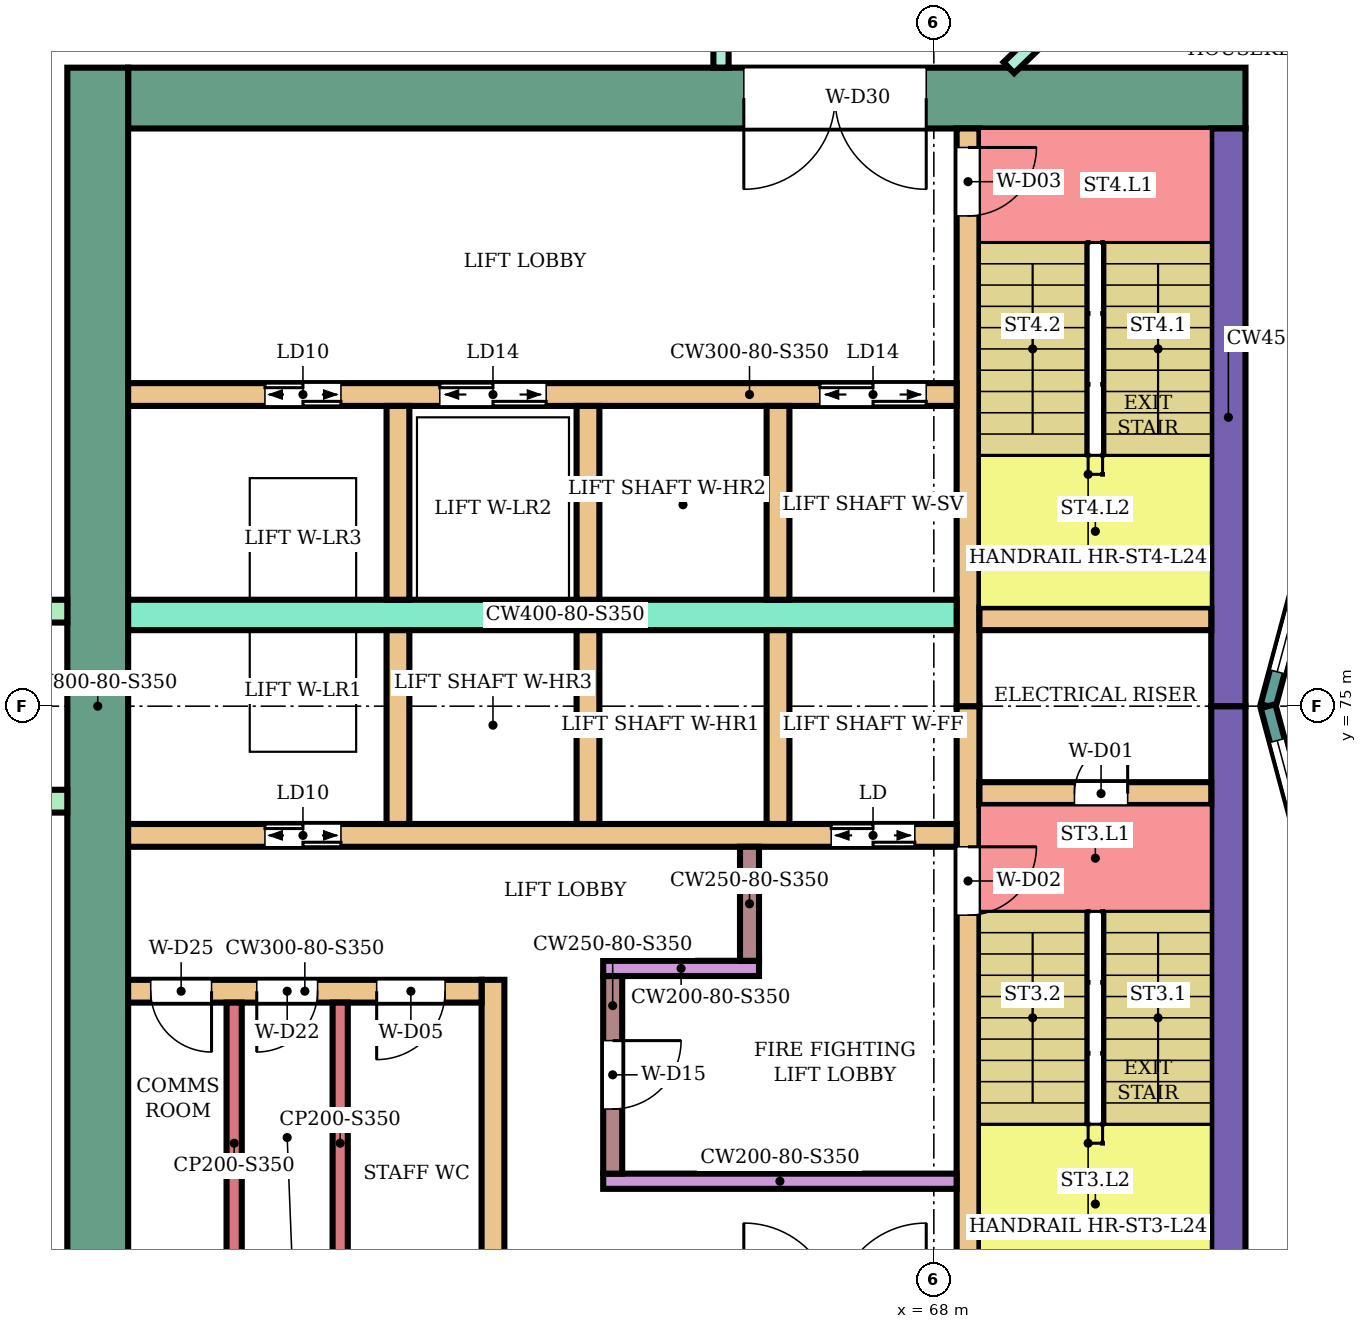
"""IFC4 building model, lengths in metres.
Left out: names, types, materials, properties, quantities, classifications, styles, units other than length and angle.
Written with IfcOpenShell. Run it as: python <this file> out.ifc"""

import sys

from ifc_helpers import new_model, si_unit, direction, frame, frame_2d, origin, place, context, subcontext, project, spatial, rectangle, extrude, element, fill, save


model = new_model("IFC4")
c1 = context("Model", 3, precision=1e-05, world=origin(), true_north=direction((0.0, 1.0)))
c2 = subcontext(c1, "Body", "Model", "MODEL_VIEW")
j1 = project(units=[si_unit("LENGTHUNIT", "METRE"), si_unit("PLANEANGLEUNIT", "RADIAN")], contexts=[c1])
p1 = place(None, origin())
s1 = spatial("IfcSite", under=j1, at=p1, CompositionType="ELEMENT")
p2 = place(p1, origin())
s2 = spatial("IfcBuilding", under=s1, at=p2, CompositionType="ELEMENT")
p3 = place(p2, frame((0.0, 0.0, 105.2)))
s3 = spatial("IfcBuildingStorey", under=s2, at=p3, CompositionType="ELEMENT", Elevation=105.2)
p4 = place(p3, frame((72.1, 83.0, 0.0), z_axis=(0.0, 0.0, 1.0), x_axis=(-1.0, 0.0, 0.0)))
e1 = element("IfcWall", 1, at=p4, inside=s3, PredefinedType="SHEAR", context=c2, shape_type="SweptSolid", body=[
    extrude(rectangle(XDim=14.7, YDim=0.8, at=frame_2d((7.35, 0.0))), origin(), (0.0, 0.0, 1.0), 3.45),
])
p5 = place(p4, frame((4.2, 0.0, 0.0)))
e2 = element("IfcOpeningElement", 2, at=p5, cuts=e1, PredefinedType="OPENING", context=c2, shape_type="SweptSolid", body=[
    extrude(rectangle(XDim=2.4, YDim=2.4, at=frame_2d((1.2, 1.2))), frame((0.0, 0.41, 0.0), z_axis=(0.0, -1.0, 0.0), x_axis=(1.0, 0.0, 0.0)), (0.0, 0.0, 1.0), 0.82),
])
for number, where, z_axis, x_axis in (
    (3, (71.875, 75.0, 0.0), (0.0, 0.0, 1.0), (0.0, -1.0, 0.0)),
    (4, (71.875, 82.6, 0.0), (0.0, 0.0, 1.0), (0.0, -1.0, 0.0)),
):
    element("IfcWall", number, at=place(p3, frame(where, z_axis=z_axis, x_axis=x_axis)), inside=s3, PredefinedType="SHEAR", context=c2, shape_type="SweptSolid", body=[
        extrude(rectangle(XDim=7.6, YDim=0.45, at=frame_2d((3.8, 0.0))), origin(), (0.0, 0.0, 1.0), 3.45),
    ])
p6 = place(p3, frame((57.0, 83.4, 0.0), z_axis=(0.0, 0.0, 1.0), x_axis=(0.0, -1.0, 0.0)))
e5 = element("IfcWall", 5, at=p6, inside=s3, PredefinedType="SHEAR", context=c2, shape_type="SweptSolid", body=[
    extrude(rectangle(XDim=16.8, YDim=0.8, at=frame_2d((8.4, 0.0))), origin(), (0.0, 0.0, 1.0), 3.45),
])
p7 = place(p3, frame((68.45, 75.0, 0.0), z_axis=(0.0, 0.0, 1.0), x_axis=(0.0, -1.0, 0.0)))
e6 = element("IfcWall", 6, at=p7, inside=s3, PredefinedType="SHEAR", context=c2, shape_type="SweptSolid", body=[
    extrude(rectangle(XDim=7.6, YDim=0.3, at=frame_2d((3.8, 0.0))), origin(), (0.0, 0.0, 1.0), 3.45),
])
p8 = place(p7, frame((1.85, 0.0, 0.0)))
e7 = element("IfcOpeningElement", 7, at=p8, cuts=e6, PredefinedType="OPENING", context=c2, shape_type="SweptSolid", body=[
    extrude(rectangle(XDim=0.9, YDim=2.1, at=frame_2d((0.45, 1.05))), frame((0.0, 0.16, 0.0), z_axis=(0.0, -1.0, 0.0), x_axis=(1.0, 0.0, 0.0)), (0.0, 0.0, 1.0), 0.32),
])
p9 = place(p3, frame((68.45, 82.6, 0.0), z_axis=(0.0, 0.0, 1.0), x_axis=(0.0, -1.0, 0.0)))
e8 = element("IfcWall", 8, at=p9, inside=s3, PredefinedType="SHEAR", context=c2, shape_type="SweptSolid", body=[
    extrude(rectangle(XDim=7.6, YDim=0.3, at=frame_2d((3.8, 0.0))), origin(), (0.0, 0.0, 1.0), 3.45),
])
p10 = place(p9, frame((0.25, 0.0, 0.0)))
e9 = element("IfcOpeningElement", 9, at=p10, cuts=e8, PredefinedType="OPENING", context=c2, shape_type="SweptSolid", body=[
    extrude(rectangle(XDim=0.9, YDim=2.1, at=frame_2d((0.45, 1.05))), frame((0.0, 0.16, 0.0), z_axis=(0.0, -1.0, 0.0), x_axis=(1.0, 0.0, 0.0)), (0.0, 0.0, 1.0), 0.32),
])
p11 = place(p3, frame((71.65, 73.85, 0.0), z_axis=(0.0, 0.0, 1.0), x_axis=(-1.0, 0.0, 0.0)))
e10 = element("IfcWall", 10, at=p11, inside=s3, PredefinedType="SHEAR", context=c2, shape_type="SweptSolid", body=[
    extrude(rectangle(XDim=3.05, YDim=0.3, at=frame_2d((1.525, 0.0))), origin(), (0.0, 0.0, 1.0), 3.45),
])
p12 = place(p11, frame((1.1, 0.0, 0.0)))
e11 = element("IfcOpeningElement", 11, at=p12, cuts=e10, PredefinedType="OPENING", context=c2, shape_type="SweptSolid", body=[
    extrude(rectangle(XDim=0.7, YDim=2.0, at=frame_2d((0.35, 1.0))), frame((0.0, 0.16, 0.0), z_axis=(0.0, -1.0, 0.0), x_axis=(1.0, 0.0, 0.0)), (0.0, 0.0, 1.0), 0.32),
])
p13 = place(p3, frame((71.65, 76.15, 0.0), z_axis=(0.0, 0.0, 1.0), x_axis=(-1.0, 0.0, 0.0)))
e12 = element("IfcWall", 12, at=p13, inside=s3, PredefinedType="SHEAR", context=c2, shape_type="SweptSolid", body=[
    extrude(rectangle(XDim=3.05, YDim=0.3, at=frame_2d((1.525, 0.0))), origin(), (0.0, 0.0, 1.0), 3.45),
])
p14 = place(p3, frame((68.3, 73.3, 0.0), z_axis=(0.0, 0.0, 1.0), x_axis=(-1.0, 0.0, 0.0)))
e13 = element("IfcWall", 13, at=p14, inside=s3, PredefinedType="SHEAR", context=c2, shape_type="SweptSolid", body=[
    extrude(rectangle(XDim=10.9, YDim=0.3, at=frame_2d((5.45, 0.0))), origin(), (0.0, 0.0, 1.0), 3.45),
])
p15 = place(p14, frame((0.55, 0.0, 0.0)))
e14 = element("IfcOpeningElement", 14, at=p15, cuts=e13, PredefinedType="OPENING", context=c2, shape_type="SweptSolid", body=[
    extrude(rectangle(XDim=1.1, YDim=2.1, at=frame_2d((0.55, 1.05))), frame((0.0, 0.16, 0.0), z_axis=(0.0, -1.0, 0.0), x_axis=(1.0, 0.0, 0.0)), (0.0, 0.0, 1.0), 0.32),
])
p16 = place(p14, frame((8.1, 0.0, 0.0)))
e15 = element("IfcOpeningElement", 15, at=p16, cuts=e13, PredefinedType="OPENING", context=c2, shape_type="SweptSolid", body=[
    extrude(rectangle(XDim=1.0, YDim=2.1, at=frame_2d((0.5, 1.05))), frame((0.0, 0.16, 0.0), z_axis=(0.0, -1.0, 0.0), x_axis=(1.0, 0.0, 0.0)), (0.0, 0.0, 1.0), 0.32),
])
p17 = place(p3, frame((68.3, 76.2, 0.0), z_axis=(0.0, 0.0, 1.0), x_axis=(-1.0, 0.0, 0.0)))
e16 = element("IfcWall", 16, at=p17, inside=s3, PredefinedType="SHEAR", context=c2, shape_type="SweptSolid", body=[
    extrude(rectangle(XDim=10.9, YDim=0.4, at=frame_2d((5.45, 0.0))), origin(), (0.0, 0.0, 1.0), 3.45),
])
p18 = place(p3, frame((68.3, 79.1, 0.0), z_axis=(0.0, 0.0, 1.0), x_axis=(-1.0, 0.0, 0.0)))
e17 = element("IfcWall", 17, at=p18, inside=s3, PredefinedType="SHEAR", context=c2, shape_type="SweptSolid", body=[
    extrude(rectangle(XDim=10.9, YDim=0.3, at=frame_2d((5.45, 0.0))), origin(), (0.0, 0.0, 1.0), 3.45),
])
p19 = place(p18, frame((0.4, 0.0, 0.0)))
e18 = element("IfcOpeningElement", 18, at=p19, cuts=e17, PredefinedType="OPENING", context=c2, shape_type="SweptSolid", body=[
    extrude(rectangle(XDim=1.4, YDim=2.1, at=frame_2d((0.7, 1.05))), frame((0.0, 0.16, 0.0), z_axis=(0.0, -1.0, 0.0), x_axis=(1.0, 0.0, 0.0)), (0.0, 0.0, 1.0), 0.32),
])
p20 = place(p18, frame((5.4, 0.0, 0.0)))
e19 = element("IfcOpeningElement", 19, at=p20, cuts=e17, PredefinedType="OPENING", context=c2, shape_type="SweptSolid", body=[
    extrude(rectangle(XDim=1.4, YDim=2.1, at=frame_2d((0.7, 1.05))), frame((0.0, 0.16, 0.0), z_axis=(0.0, -1.0, 0.0), x_axis=(1.0, 0.0, 0.0)), (0.0, 0.0, 1.0), 0.32),
])
p21 = place(p18, frame((8.1, 0.0, 0.0)))
e20 = element("IfcOpeningElement", 20, at=p21, cuts=e17, PredefinedType="OPENING", context=c2, shape_type="SweptSolid", body=[
    extrude(rectangle(XDim=1.0, YDim=2.1, at=frame_2d((0.5, 1.05))), frame((0.0, 0.16, 0.0), z_axis=(0.0, -1.0, 0.0), x_axis=(1.0, 0.0, 0.0)), (0.0, 0.0, 1.0), 0.32),
])
for number, where, z_axis, x_axis in (
    (21, (65.95, 76.0, 0.0), (0.0, 0.0, 1.0), (0.0, -1.0, 0.0)),
    (22, (63.45, 76.0, 0.0), (0.0, 0.0, 1.0), (0.0, -1.0, 0.0)),
    (23, (60.95, 76.0, 0.0), (0.0, 0.0, 1.0), (0.0, -1.0, 0.0)),
    (24, (65.95, 78.95, 0.0), (0.0, 0.0, 1.0), (0.0, -1.0, 0.0)),
    (25, (63.45, 78.95, 0.0), (0.0, 0.0, 1.0), (0.0, -1.0, 0.0)),
    (26, (60.95, 78.95, 0.0), (0.0, 0.0, 1.0), (0.0, -1.0, 0.0)),
):
    element("IfcWall", number, at=place(p3, frame(where, z_axis=z_axis, x_axis=x_axis)), inside=s3, PredefinedType="SHEAR", context=c2, shape_type="SweptSolid", body=[
        extrude(rectangle(XDim=2.55, YDim=0.3, at=frame_2d((1.275, 0.0))), origin(), (0.0, 0.0, 1.0), 3.45),
    ])
p22 = place(p3, frame((68.3, 68.75, 0.0), z_axis=(0.0, 0.0, 1.0), x_axis=(-1.0, 0.0, 0.0)))
e27 = element("IfcWall", 27, at=p22, inside=s3, PredefinedType="SHEAR", context=c2, shape_type="SweptSolid", body=[
    extrude(rectangle(XDim=4.65, YDim=0.2, at=frame_2d((2.325, 0.0))), origin(), (0.0, 0.0, 1.0), 3.45),
])
p23 = place(p3, frame((63.775, 71.45, 0.0), z_axis=(0.0, 0.0, 1.0), x_axis=(0.0, -1.0, 0.0)))
e28 = element("IfcWall", 28, at=p23, inside=s3, PredefinedType="SHEAR", context=c2, shape_type="SweptSolid", body=[
    extrude(rectangle(XDim=2.6, YDim=0.25, at=frame_2d((1.3, 0.0))), origin(), (0.0, 0.0, 1.0), 3.45),
])
p24 = place(p23, frame((0.85, 0.0, 0.0)))
e29 = element("IfcOpeningElement", 29, at=p24, cuts=e28, PredefinedType="OPENING", context=c2, shape_type="SweptSolid", body=[
    extrude(rectangle(XDim=0.9, YDim=2.1, at=frame_2d((0.45, 1.05))), frame((0.0, 0.135, 0.0), z_axis=(0.0, -1.0, 0.0), x_axis=(1.0, 0.0, 0.0)), (0.0, 0.0, 1.0), 0.27),
])
p25 = place(p3, frame((65.7, 71.55, 0.0), z_axis=(0.0, 0.0, 1.0), x_axis=(-1.0, 0.0, 0.0)))
e30 = element("IfcWall", 30, at=p25, inside=s3, PredefinedType="SHEAR", context=c2, shape_type="SweptSolid", body=[
    extrude(rectangle(XDim=2.05, YDim=0.2, at=frame_2d((1.025, 0.0))), origin(), (0.0, 0.0, 1.0), 3.45),
])
p26 = place(p3, frame((65.575, 73.15, 0.0), z_axis=(0.0, 0.0, 1.0), x_axis=(0.0, -1.0, 0.0)))
e31 = element("IfcWall", 31, at=p26, inside=s3, PredefinedType="SHEAR", context=c2, shape_type="SweptSolid", body=[
    extrude(rectangle(XDim=1.5, YDim=0.25, at=frame_2d((0.75, 0.0))), origin(), (0.0, 0.0, 1.0), 3.45),
])
p27 = place(p3, frame((62.2, 71.4, 0.0), z_axis=(0.0, 0.0, 1.0), x_axis=(0.0, -1.0, 0.0)))
e32 = element("IfcWall", 32, at=p27, inside=s3, PredefinedType="SHEAR", context=c2, shape_type="SweptSolid", body=[
    extrude(rectangle(XDim=4.0, YDim=0.3, at=frame_2d((2.0, 0.0))), origin(), (0.0, 0.0, 1.0), 3.45),
])
p28 = place(p3, frame((62.05, 71.25, 0.0), z_axis=(0.0, 0.0, 1.0), x_axis=(-1.0, 0.0, 0.0)))
e33 = element("IfcWall", 33, at=p28, inside=s3, PredefinedType="SHEAR", context=c2, shape_type="SweptSolid", body=[
    extrude(rectangle(XDim=4.65, YDim=0.3, at=frame_2d((2.325, 0.0))), origin(), (0.0, 0.0, 1.0), 3.45),
])
p29 = place(p28, frame((0.48, 0.0, 0.0)))
e34 = element("IfcOpeningElement", 34, at=p29, cuts=e33, PredefinedType="OPENING", context=c2, shape_type="SweptSolid", body=[
    extrude(rectangle(XDim=0.9, YDim=2.1, at=frame_2d((0.45, 1.05))), frame((0.0, 0.16, 0.0), z_axis=(0.0, -1.0, 0.0), x_axis=(1.0, 0.0, 0.0)), (0.0, 0.0, 1.0), 0.32),
])
p30 = place(p28, frame((2.157, 0.0, 0.0)))
e35 = element("IfcOpeningElement", 35, at=p30, cuts=e33, PredefinedType="OPENING", context=c2, shape_type="SweptSolid", body=[
    extrude(rectangle(XDim=0.8, YDim=2.1, at=frame_2d((0.4, 1.05))), frame((0.0, 0.16, 0.0), z_axis=(0.0, -1.0, 0.0), x_axis=(1.0, 0.0, 0.0)), (0.0, 0.0, 1.0), 0.32),
])
p31 = place(p28, frame((3.552, 0.0, 0.0)))
e36 = element("IfcOpeningElement", 36, at=p31, cuts=e33, PredefinedType="OPENING", context=c2, shape_type="SweptSolid", body=[
    extrude(rectangle(XDim=0.8, YDim=2.1, at=frame_2d((0.4, 1.05))), frame((0.0, 0.16, 0.0), z_axis=(0.0, -1.0, 0.0), x_axis=(1.0, 0.0, 0.0)), (0.0, 0.0, 1.0), 0.32),
])
for number, where, z_axis, x_axis in (
    (37, (56.6, 76.25, 0.0), (0.0, 0.0, 1.0), (-1.0, 0.0, 0.0)),
    (38, (56.6, 73.75, 0.0), (0.0, 0.0, 1.0), (-1.0, 0.0, 0.0)),
):
    element("IfcWall", number, at=place(p3, frame(where, z_axis=z_axis, x_axis=x_axis)), inside=s3, PredefinedType="NOTDEFINED", context=c2, shape_type="SweptSolid", body=[
        extrude(rectangle(XDim=2.416, YDim=0.3, at=frame_2d((1.208, 0.0))), origin(), (0.0, 0.0, 1.0), 3.8),
    ])
p32 = place(p3, frame((73.415, 78.802, 0.0), z_axis=(0.0, 0.0, 1.0), x_axis=(-0.258789828301, -0.965933654434, 0.0)))
e39 = element("IfcWall", 39, at=p32, inside=s3, PredefinedType="NOTDEFINED", context=c2, shape_type="SweptSolid", body=[
    extrude(rectangle(XDim=3.936, YDim=0.2, at=frame_2d((1.968, 0.0))), origin(), (0.0, 0.0, 1.0), 3.8),
])
p33 = place(p32, frame((0.468, 0.0, 0.9)))
e40 = element("IfcOpeningElement", 40, at=p33, cuts=e39, PredefinedType="OPENING", context=c2, shape_type="SweptSolid", body=[
    extrude(rectangle(XDim=3.0, YDim=2.3, at=frame_2d((1.5, 1.15))), frame((0.0, 0.11, 0.0), z_axis=(0.0, -1.0, 0.0), x_axis=(1.0, 0.0, 0.0)), (0.0, 0.0, 1.0), 0.22),
])
p34 = place(p3, frame((72.396, 75.0, 0.0), z_axis=(0.0, 0.0, 1.0), x_axis=(0.258789828301, -0.965933654434, 0.0)))
e41 = element("IfcWall", 41, at=p34, inside=s3, PredefinedType="NOTDEFINED", context=c2, shape_type="SweptSolid", body=[
    extrude(rectangle(XDim=3.936, YDim=0.2, at=frame_2d((1.968, 0.0))), origin(), (0.0, 0.0, 1.0), 3.8),
])
p35 = place(p34, frame((0.468, 0.0, 0.9)))
e42 = element("IfcOpeningElement", 42, at=p35, cuts=e41, PredefinedType="OPENING", context=c2, shape_type="SweptSolid", body=[
    extrude(rectangle(XDim=3.0, YDim=2.3, at=frame_2d((1.5, 1.15))), frame((0.0, 0.11, 0.0), z_axis=(0.0, -1.0, 0.0), x_axis=(1.0, 0.0, 0.0)), (0.0, 0.0, 1.0), 0.22),
])
p36 = place(p3, frame((65.2, 83.401, 0.0), z_axis=(0.0, 0.0, 1.0), x_axis=(0.0, 1.0, 0.0)))
e43 = element("IfcWall", 43, at=p36, inside=s3, PredefinedType="PARTITIONING", context=c2, shape_type="SweptSolid", body=[
    extrude(rectangle(XDim=1.399, YDim=0.2, at=frame_2d((0.7, 0.0))), origin(), (0.0, 0.0, 1.0), 3.35),
])
p37 = place(p3, frame((68.987, 83.4, 0.0), z_axis=(0.0, 0.0, 1.0), x_axis=(0.719547721855, 0.694442996922, 0.0)))
e44 = element("IfcWall", 44, at=p37, inside=s3, PredefinedType="PARTITIONING", context=c2, shape_type="SweptSolid", body=[
    extrude(rectangle(XDim=5.378, YDim=0.2, at=frame_2d((2.689, 0.0))), origin(), (0.0, 0.0, 1.0), 3.35),
])
p38 = place(p37, frame((2.294, 0.0, 0.0)))
e45 = element("IfcOpeningElement", 45, at=p38, cuts=e44, PredefinedType="OPENING", context=c2, shape_type="SweptSolid", body=[
    extrude(rectangle(XDim=0.9, YDim=2.1, at=frame_2d((0.45, 1.05))), frame((0.0, 0.11, 0.0), z_axis=(0.0, -1.0, 0.0), x_axis=(1.0, 0.0, 0.0)), (0.0, 0.0, 1.0), 0.22),
])
for number, where, z_axis, x_axis in (
    (46, (60.19, 71.1, 0.0), (0.0, 0.0, 1.0), (0.0, -1.0, 0.0)),
    (47, (58.795, 71.1, 0.0), (0.0, 0.0, 1.0), (0.0, -1.0, 0.0)),
):
    element("IfcWall", number, at=place(p3, frame(where, z_axis=z_axis, x_axis=x_axis)), inside=s3, PredefinedType="PARTITIONING", context=c2, shape_type="SweptSolid", body=[
        extrude(rectangle(XDim=3.7, YDim=0.2, at=frame_2d((1.85, 0.0))), origin(), (0.0, 0.0, 1.0), 3.45),
    ])
p39 = place(p33, origin())
e48 = element("IfcWindow", 48, at=p39, inside=s3, PartitioningType="SINGLE_PANEL", PredefinedType="WINDOW", context=c2, shape_type="SweptSolid", body=[
    extrude(rectangle(XDim=3.0, YDim=2.3, at=frame_2d((1.5, 1.15))), frame((0.0, 0.03, 0.0), z_axis=(0.0, -1.0, 0.0), x_axis=(1.0, 0.0, 0.0)), (0.0, 0.0, 1.0), 0.06),
])
fill(e40, e48)
p40 = place(p35, origin())
e49 = element("IfcWindow", 49, at=p40, inside=s3, PartitioningType="SINGLE_PANEL", PredefinedType="WINDOW", context=c2, shape_type="SweptSolid", body=[
    extrude(rectangle(XDim=3.0, YDim=2.3, at=frame_2d((1.5, 1.15))), frame((0.0, 0.03, 0.0), z_axis=(0.0, -1.0, 0.0), x_axis=(1.0, 0.0, 0.0)), (0.0, 0.0, 1.0), 0.06),
])
fill(e42, e49)
p41 = place(p12, frame((0.7, 0.0, 0.0), z_axis=(0.0, 0.0, 1.0), x_axis=(-1.0, 0.0, 0.0)))
e50 = element("IfcDoor", 50, at=p41, inside=s3, OperationType="SINGLE_SWING_RIGHT", PredefinedType="DOOR", context=c2, shape_type="SweptSolid", body=[
    extrude(rectangle(XDim=0.7, YDim=2.0, at=frame_2d((0.35, 1.0))), frame((0.0, 0.025, 0.0), z_axis=(0.0, -1.0, 0.0), x_axis=(1.0, 0.0, 0.0)), (0.0, 0.0, 1.0), 0.05),
])
fill(e11, e50)
p42 = place(p8, origin())
e51 = element("IfcDoor", 51, at=p42, inside=s3, OperationType="SINGLE_SWING_LEFT", PredefinedType="DOOR", context=c2, shape_type="SweptSolid", body=[
    extrude(rectangle(XDim=0.9, YDim=2.1, at=frame_2d((0.45, 1.05))), frame((0.0, 0.025, 0.0), z_axis=(0.0, -1.0, 0.0), x_axis=(1.0, 0.0, 0.0)), (0.0, 0.0, 1.0), 0.05),
])
fill(e7, e51)
p43 = place(p10, origin())
e52 = element("IfcDoor", 52, at=p43, inside=s3, OperationType="SINGLE_SWING_LEFT", PredefinedType="DOOR", context=c2, shape_type="SweptSolid", body=[
    extrude(rectangle(XDim=0.9, YDim=2.1, at=frame_2d((0.45, 1.05))), frame((0.0, 0.025, 0.0), z_axis=(0.0, -1.0, 0.0), x_axis=(1.0, 0.0, 0.0)), (0.0, 0.0, 1.0), 0.05),
])
fill(e9, e52)
p44 = place(p15, origin())
e53 = element("IfcDoor", 53, at=p44, inside=s3, OperationType="DOUBLE_DOOR_SLIDING", PredefinedType="DOOR", context=c2, shape_type="SweptSolid", body=[
    extrude(rectangle(XDim=1.1, YDim=2.1, at=frame_2d((0.55, 1.05))), frame((0.0, 0.025, 0.0), z_axis=(0.0, -1.0, 0.0), x_axis=(1.0, 0.0, 0.0)), (0.0, 0.0, 1.0), 0.05),
])
fill(e14, e53)
p45 = place(p16, origin())
e54 = element("IfcDoor", 54, at=p45, inside=s3, OperationType="DOUBLE_DOOR_SLIDING", PredefinedType="DOOR", context=c2, shape_type="SweptSolid", body=[
    extrude(rectangle(XDim=1.0, YDim=2.1, at=frame_2d((0.5, 1.05))), frame((0.0, 0.025, 0.0), z_axis=(0.0, -1.0, 0.0), x_axis=(1.0, 0.0, 0.0)), (0.0, 0.0, 1.0), 0.05),
])
fill(e15, e54)
p46 = place(p19, origin())
e55 = element("IfcDoor", 55, at=p46, inside=s3, OperationType="DOUBLE_DOOR_SLIDING", PredefinedType="DOOR", context=c2, shape_type="SweptSolid", body=[
    extrude(rectangle(XDim=1.4, YDim=2.1, at=frame_2d((0.7, 1.05))), frame((0.0, 0.025, 0.0), z_axis=(0.0, -1.0, 0.0), x_axis=(1.0, 0.0, 0.0)), (0.0, 0.0, 1.0), 0.05),
])
fill(e18, e55)
p47 = place(p20, origin())
e56 = element("IfcDoor", 56, at=p47, inside=s3, OperationType="DOUBLE_DOOR_SLIDING", PredefinedType="DOOR", context=c2, shape_type="SweptSolid", body=[
    extrude(rectangle(XDim=1.4, YDim=2.1, at=frame_2d((0.7, 1.05))), frame((0.0, 0.025, 0.0), z_axis=(0.0, -1.0, 0.0), x_axis=(1.0, 0.0, 0.0)), (0.0, 0.0, 1.0), 0.05),
])
fill(e19, e56)
p48 = place(p21, origin())
e57 = element("IfcDoor", 57, at=p48, inside=s3, OperationType="DOUBLE_DOOR_SLIDING", PredefinedType="DOOR", context=c2, shape_type="SweptSolid", body=[
    extrude(rectangle(XDim=1.0, YDim=2.1, at=frame_2d((0.5, 1.05))), frame((0.0, 0.025, 0.0), z_axis=(0.0, -1.0, 0.0), x_axis=(1.0, 0.0, 0.0)), (0.0, 0.0, 1.0), 0.05),
])
fill(e20, e57)
p49 = place(p24, origin())
e58 = element("IfcDoor", 58, at=p49, inside=s3, OperationType="SINGLE_SWING_LEFT", PredefinedType="DOOR", context=c2, shape_type="SweptSolid", body=[
    extrude(rectangle(XDim=0.9, YDim=2.1, at=frame_2d((0.45, 1.05))), frame((0.0, 0.025, 0.0), z_axis=(0.0, -1.0, 0.0), x_axis=(1.0, 0.0, 0.0)), (0.0, 0.0, 1.0), 0.05),
])
fill(e29, e58)
p50 = place(p29, origin())
e59 = element("IfcDoor", 59, at=p50, inside=s3, OperationType="SINGLE_SWING_RIGHT", PredefinedType="DOOR", context=c2, shape_type="SweptSolid", body=[
    extrude(rectangle(XDim=0.9, YDim=2.1, at=frame_2d((0.45, 1.05))), frame((0.0, 0.025, 0.0), z_axis=(0.0, -1.0, 0.0), x_axis=(1.0, 0.0, 0.0)), (0.0, 0.0, 1.0), 0.05),
])
fill(e34, e59)
p51 = place(p30, origin())
e60 = element("IfcDoor", 60, at=p51, inside=s3, OperationType="SINGLE_SWING_RIGHT", PredefinedType="DOOR", context=c2, shape_type="SweptSolid", body=[
    extrude(rectangle(XDim=0.8, YDim=2.1, at=frame_2d((0.4, 1.05))), frame((0.0, 0.025, 0.0), z_axis=(0.0, -1.0, 0.0), x_axis=(1.0, 0.0, 0.0)), (0.0, 0.0, 1.0), 0.05),
])
fill(e35, e60)
p52 = place(p31, origin())
e61 = element("IfcDoor", 61, at=p52, inside=s3, OperationType="SINGLE_SWING_LEFT", PredefinedType="DOOR", context=c2, shape_type="SweptSolid", body=[
    extrude(rectangle(XDim=0.8, YDim=2.1, at=frame_2d((0.4, 1.05))), frame((0.0, 0.025, 0.0), z_axis=(0.0, -1.0, 0.0), x_axis=(1.0, 0.0, 0.0)), (0.0, 0.0, 1.0), 0.05),
])
fill(e36, e61)
p53 = place(p5, origin())
e62 = element("IfcDoor", 62, at=p53, inside=s3, OperationType="DOUBLE_DOOR_SINGLE_SWING", PredefinedType="DOOR", context=c2, shape_type="SweptSolid", body=[
    extrude(rectangle(XDim=2.4, YDim=2.4, at=frame_2d((1.2, 1.2))), frame((0.0, 0.025, 0.0), z_axis=(0.0, -1.0, 0.0), x_axis=(1.0, 0.0, 0.0)), (0.0, 0.0, 1.0), 0.05),
])
fill(e2, e62)
save(model, sys.argv[1])
